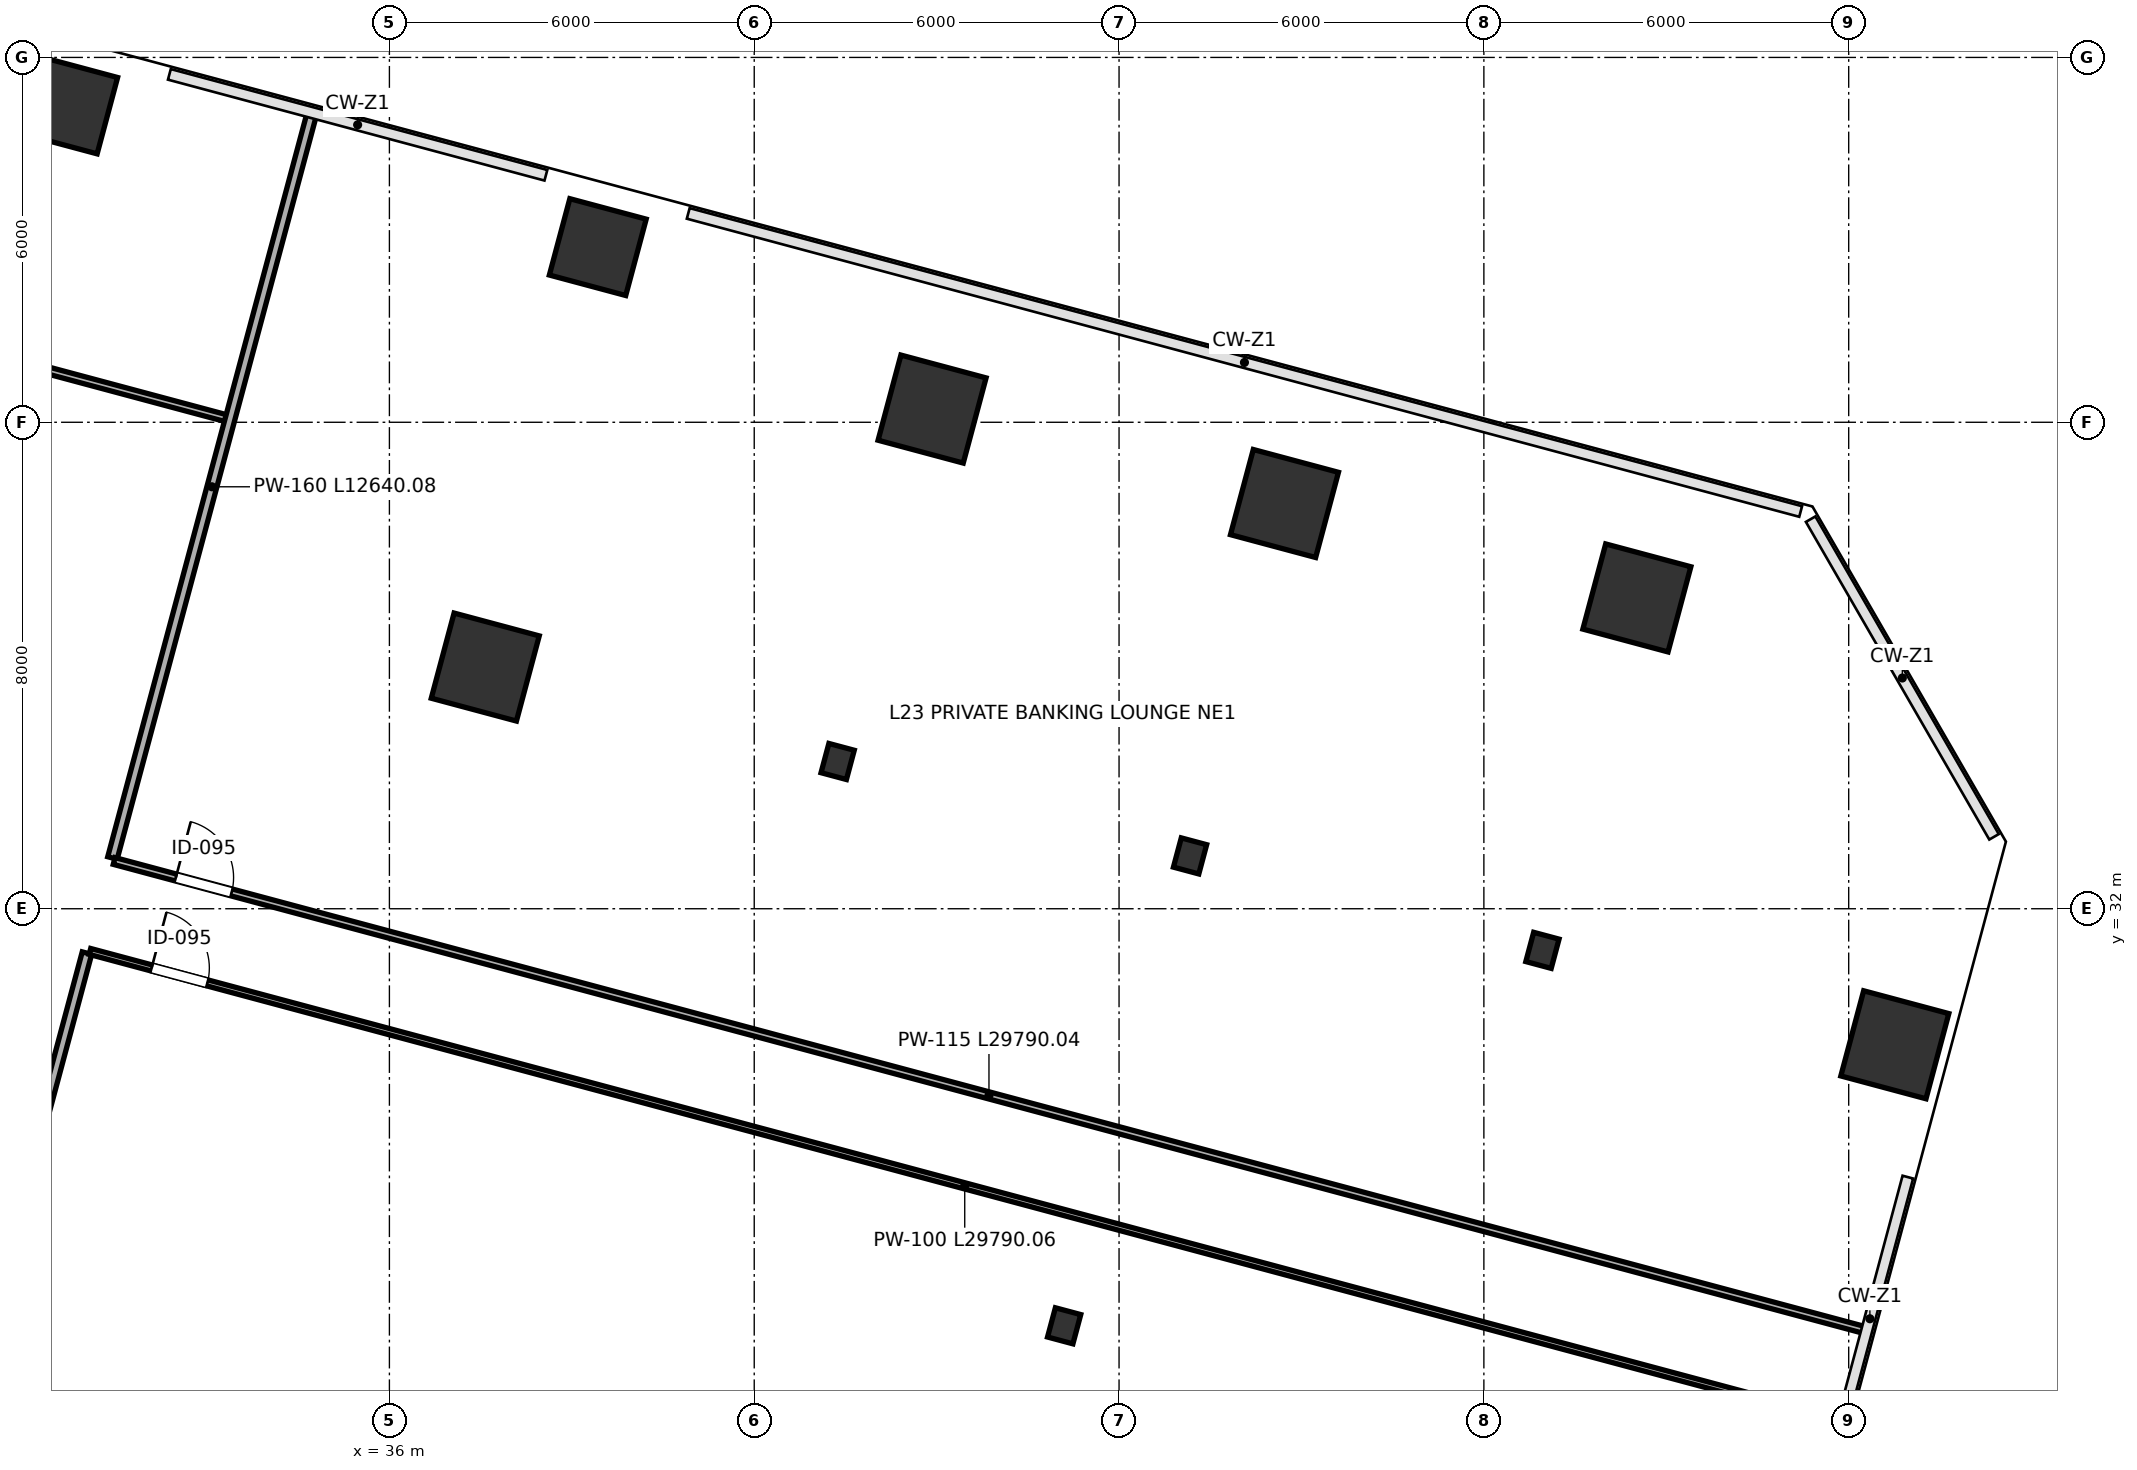
"""IFC4 building model, lengths in metres.
Left out: names, types, materials, properties, quantities, classifications, styles, units other than length and angle.
Written with IfcOpenShell. Run it as: python <this file> out.ifc"""

import sys

from ifc_helpers import new_model, si_unit, direction, frame, frame_2d, origin, origin_2d, place, context, subcontext, project, spatial, rectangle, i_section, extrude, clip, halfspace, source, transform, mapped, element, fill, save


model = new_model("IFC4")
c1 = context("Model", 3, precision=1e-05, world=origin(), true_north=direction((0.0, 1.0)))
c2 = subcontext(c1, "Body", "Model", "MODEL_VIEW")
j1 = project(units=[si_unit("LENGTHUNIT", "METRE"), si_unit("PLANEANGLEUNIT", "RADIAN")], contexts=[c1])
p1 = place(None, origin())
s1 = spatial("IfcSite", under=j1, at=p1, CompositionType="ELEMENT")
p2 = place(p1, origin())
s2 = spatial("IfcBuilding", under=s1, at=p2, CompositionType="ELEMENT")
p3 = place(p2, frame((0.0, 0.0, 104.2)))
s3 = spatial("IfcBuildingStorey", under=s2, at=p3, CompositionType="ELEMENT", Elevation=104.2)
p4 = place(p3, frame((30.734, 45.21, 0.0), z_axis=(0.067889968656, -0.048542486121, 0.996511203749), x_axis=(-0.771615774853, -0.635722031456, 0.021600803684)))
e1 = element("IfcColumn", 1, at=p4, inside=s3, PredefinedType="COLUMN", context=c2, shape_type="Clipping", body=[
    clip(clip(extrude(rectangle(XDim=1.3, YDim=1.3, at=origin_2d()), origin(), (0.0, 0.0, 1.0), 4.215), halfspace(frame((0.0, 0.0, 0.067), z_axis=(0.0, 0.0, -1.0), x_axis=(1.0, 0.0, 0.0)), False)), halfspace(frame((0.0, 0.0, 4.147), z_axis=(0.0, 0.0, 1.0), x_axis=(1.0, 0.0, 0.0)), False)),
])
p5 = place(p3, frame((37.576, 35.975, 0.0), z_axis=(0.019691201847, -0.083455946651, 0.99631689815), x_axis=(-0.999328424662, 0.029157610991, 0.022193093171)))
e2 = element("IfcColumn", 2, at=p5, inside=s3, PredefinedType="COLUMN", context=c2, shape_type="Clipping", body=[
    clip(clip(extrude(rectangle(XDim=1.45, YDim=1.45, at=origin_2d()), origin(), (0.0, 0.0, 1.0), 4.216), halfspace(frame((0.0, 0.0, 0.077), z_axis=(0.0, 0.0, -1.0), x_axis=(1.0, 0.0, 0.0)), False)), halfspace(frame((0.0, 0.0, 4.138), z_axis=(0.0, 0.0, 1.0), x_axis=(1.0, 0.0, 0.0)), False)),
])
p6 = place(p3, frame((39.427, 42.881, 0.0), z_axis=(0.055187214382, -0.09315370637, 0.994121098437), x_axis=(-0.962180939911, -0.270965921455, 0.028023352452)))
e3 = element("IfcColumn", 3, at=p6, inside=s3, PredefinedType="COLUMN", context=c2, shape_type="Clipping", body=[
    clip(clip(extrude(rectangle(XDim=1.3, YDim=1.3, at=origin_2d()), origin(), (0.0, 0.0, 1.0), 4.225), halfspace(frame((0.0, 0.0, 0.087), z_axis=(0.0, 0.0, -1.0), x_axis=(1.0, 0.0, 0.0)), False)), halfspace(frame((0.0, 0.0, 4.137), z_axis=(0.0, 0.0, 1.0), x_axis=(1.0, 0.0, 0.0)), False)),
])
p7 = place(p3, frame((43.372, 34.422, 0.0), z_axis=(0.011261876741, -0.113023039907, 0.993528541403), x_axis=(-0.986662274409, 0.160104186763, 0.029397374702)))
e4 = element("IfcColumn", 4, at=p7, inside=s3, PredefinedType="COLUMN", context=c2, shape_type="Clipping", body=[
    clip(clip(extrude(i_section(OverallWidth=0.432, OverallDepth=0.498, WebThickness=0.056, FlangeThickness=0.089, FilletRadius=0.015, at=origin_2d()), origin(), (0.0, 0.0, 1.0), 4.227), halfspace(frame((0.0, 0.0, 0.035), z_axis=(0.0, 0.0, -1.0), x_axis=(1.0, 0.0, 0.0)), False)), halfspace(frame((0.0, 0.0, 4.193), z_axis=(0.0, 0.0, 1.0), x_axis=(1.0, 0.0, 0.0)), False)),
])
p8 = place(p3, frame((44.925, 40.217, 0.0), z_axis=(0.041047961289, -0.121183728413, 0.99178100851), x_axis=(-0.997219027055, -0.066765268873, 0.033115116671)))
e5 = element("IfcColumn", 5, at=p8, inside=s3, PredefinedType="COLUMN", context=c2, shape_type="Clipping", body=[
    clip(clip(extrude(rectangle(XDim=1.45, YDim=1.45, at=origin_2d()), origin(), (0.0, 0.0, 1.0), 4.235), halfspace(frame((0.0, 0.0, 0.115), z_axis=(0.0, 0.0, -1.0), x_axis=(1.0, 0.0, 0.0)), False)), halfspace(frame((0.0, 0.0, 4.12), z_axis=(0.0, 0.0, 1.0), x_axis=(1.0, 0.0, 0.0)), False)),
])
p9 = place(p3, frame((47.097, 25.141, 0.0), z_axis=(-0.036682452991, -0.131354278291, 0.990656575821), x_axis=(-0.861364861032, 0.506758959131, 0.035297783485)))
e6 = element("IfcColumn", 6, at=p9, inside=s3, PredefinedType="COLUMN", context=c2, shape_type="Clipping", body=[
    clip(clip(extrude(i_section(OverallWidth=0.432, OverallDepth=0.498, WebThickness=0.056, FlangeThickness=0.089, FilletRadius=0.015, at=origin_2d()), origin(), (0.0, 0.0, 1.0), 4.24), halfspace(frame((0.0, 0.0, 0.042), z_axis=(0.0, 0.0, -1.0), x_axis=(1.0, 0.0, 0.0)), False)), halfspace(frame((0.0, 0.0, 4.198), z_axis=(0.0, 0.0, 1.0), x_axis=(1.0, 0.0, 0.0)), False)),
])
p10 = place(p3, frame((49.167, 32.869, 0.0), z_axis=(0.002934421261, -0.142290662346, 0.989820567871), x_axis=(-0.971002586925, 0.236214165868, 0.036835363839)))
e7 = element("IfcColumn", 7, at=p10, inside=s3, PredefinedType="COLUMN", context=c2, shape_type="Clipping", body=[
    clip(clip(extrude(i_section(OverallWidth=0.432, OverallDepth=0.498, WebThickness=0.056, FlangeThickness=0.089, FilletRadius=0.015, at=origin_2d()), origin(), (0.0, 0.0, 1.0), 4.243), halfspace(frame((0.0, 0.0, 0.043), z_axis=(0.0, 0.0, -1.0), x_axis=(1.0, 0.0, 0.0)), False)), halfspace(frame((0.0, 0.0, 4.2), z_axis=(0.0, 0.0, 1.0), x_axis=(1.0, 0.0, 0.0)), False)),
])
p11 = place(p3, frame((50.72, 38.664, 0.0), z_axis=(0.032566924694, -0.150370738711, 0.988093131418), x_axis=(-0.998171026608, 0.04548495086, 0.039821111053)))
e8 = element("IfcColumn", 8, at=p11, inside=s3, PredefinedType="COLUMN", context=c2, shape_type="Clipping", body=[
    clip(clip(extrude(rectangle(XDim=1.45, YDim=1.45, at=origin_2d()), origin(), (0.0, 0.0, 1.0), 4.25), halfspace(frame((0.0, 0.0, 0.139), z_axis=(0.0, 0.0, -1.0), x_axis=(1.0, 0.0, 0.0)), False)), halfspace(frame((0.0, 0.0, 4.112), z_axis=(0.0, 0.0, 1.0), x_axis=(1.0, 0.0, 0.0)), False)),
])
p12 = place(p3, frame((54.963, 31.316, 0.0), z_axis=(-0.005383376269, -0.171237181336, 0.985215127263), x_axis=(-0.957436314569, 0.285218423509, 0.044341340041)))
e9 = element("IfcColumn", 9, at=p12, inside=s3, PredefinedType="COLUMN", context=c2, shape_type="Clipping", body=[
    clip(clip(extrude(i_section(OverallWidth=0.432, OverallDepth=0.498, WebThickness=0.056, FlangeThickness=0.089, FilletRadius=0.015, at=origin_2d()), origin(), (0.0, 0.0, 1.0), 4.263), halfspace(frame((0.0, 0.0, 0.052), z_axis=(0.0, 0.0, -1.0), x_axis=(1.0, 0.0, 0.0)), False)), halfspace(frame((0.0, 0.0, 4.211), z_axis=(0.0, 0.0, 1.0), x_axis=(1.0, 0.0, 0.0)), False)),
])
p13 = place(p3, frame((56.516, 37.111, 0.0), z_axis=(0.024126371662, -0.179175471061, 0.983521259943), x_axis=(-0.991256116404, 0.123376535336, 0.04679254449)))
e10 = element("IfcColumn", 10, at=p13, inside=s3, PredefinedType="COLUMN", context=c2, shape_type="Clipping", body=[
    clip(clip(extrude(rectangle(XDim=1.45, YDim=1.45, at=origin_2d()), origin(), (0.0, 0.0, 1.0), 4.27), halfspace(frame((0.0, 0.0, 0.164), z_axis=(0.0, 0.0, -1.0), x_axis=(1.0, 0.0, 0.0)), False)), halfspace(frame((0.0, 0.0, 4.106), z_axis=(0.0, 0.0, 1.0), x_axis=(1.0, 0.0, 0.0)), False)),
])
p14 = place(p3, frame((60.759, 29.763, 0.0), z_axis=(-0.013554887194, -0.199678296222, 0.979767749546), x_axis=(-0.946533328011, 0.31842027609, 0.051799485898)))
e11 = element("IfcColumn", 11, at=p14, inside=s3, PredefinedType="COLUMN", context=c2, shape_type="Clipping", body=[
    clip(clip(extrude(rectangle(XDim=1.45, YDim=1.45, at=origin_2d()), origin(), (0.0, 0.0, 1.0), 4.287), halfspace(frame((0.0, 0.0, 0.182), z_axis=(0.0, 0.0, -1.0), x_axis=(1.0, 0.0, 0.0)), False)), halfspace(frame((0.0, 0.0, 4.104), z_axis=(0.0, 0.0, 1.0), x_axis=(1.0, 0.0, 0.0)), False)),
])
p15 = place(p3, frame((8.071, 46.831, 0.0), z_axis=(0.0, 0.0, 1.0), x_axis=(0.965925848141, -0.258818963551, 0.0)))
e12 = element("IfcWall", 12, at=p15, inside=s3, PredefinedType="PARTITIONING", context=c2, shape_type="SweptSolid", body=[
    extrude(rectangle(XDim=26.16, YDim=0.115, at=frame_2d((13.08, 0.0))), origin(), (0.0, 0.0, 1.0), 3.96),
])
p16 = place(p15, frame((1.05, 0.0, 0.0)))
e13 = element("IfcOpeningElement", 13, at=p16, cuts=e12, PredefinedType="OPENING", context=c2, shape_type="SweptSolid", body=[
    extrude(rectangle(XDim=0.95, YDim=2.15, at=frame_2d((0.475, 1.075))), frame((0.0, 0.067, 0.0), z_axis=(0.0, -1.0, 0.0), x_axis=(1.0, 0.0, 0.0)), (0.0, 0.0, 1.0), 0.135),
])
p17 = place(p3, frame((31.445, 32.834, 0.0), z_axis=(0.0, 0.0, 1.0), x_axis=(0.258816538161, 0.965926498018, 0.0)))
e14 = element("IfcWall", 14, at=p17, inside=s3, PredefinedType="PARTITIONING", context=c2, shape_type="SweptSolid", body=[
    extrude(rectangle(XDim=12.64, YDim=0.16, at=frame_2d((6.32, 0.0))), origin(), (0.0, 0.0, 1.0), 3.095),
])
p18 = place(p3, frame((25.906, 12.164, 0.0), z_axis=(0.0, 0.0, 1.0), x_axis=(0.258805595447, 0.965929430013, 0.0)))
e15 = element("IfcWall", 15, at=p18, inside=s3, PredefinedType="PARTITIONING", context=c2, shape_type="SweptSolid", body=[
    extrude(rectangle(XDim=19.78, YDim=0.16, at=frame_2d((9.89, 0.0))), origin(), (0.0, 0.0, 1.0), 3.96),
])
p19 = place(p3, frame((31.473, 32.785, 0.0), z_axis=(0.0, 0.0, 1.0), x_axis=(0.965927931901, -0.258811186722, 0.0)))
e16 = element("IfcWall", 16, at=p19, inside=s3, PredefinedType="PARTITIONING", context=c2, shape_type="SweptSolid", body=[
    extrude(rectangle(XDim=29.79, YDim=0.115, at=frame_2d((14.895, 0.0))), origin(), (0.0, 0.0, 1.0), 3.095),
])
p20 = place(p19, frame((1.05, 0.0, 0.0)))
e17 = element("IfcOpeningElement", 17, at=p20, cuts=e16, PredefinedType="OPENING", context=c2, shape_type="SweptSolid", body=[
    extrude(rectangle(XDim=0.95, YDim=2.15, at=frame_2d((0.475, 1.075))), frame((0.0, 0.067, 0.0), z_axis=(0.0, -1.0, 0.0), x_axis=(1.0, 0.0, 0.0)), (0.0, 0.0, 1.0), 0.135),
])
p21 = place(p3, frame((31.074, 31.298, 0.0), z_axis=(0.0, 0.0, 1.0), x_axis=(0.96592643206, -0.258816784325, 0.0)))
e18 = element("IfcWall", 18, at=p21, inside=s3, PredefinedType="PARTITIONING", context=c2, shape_type="SweptSolid", body=[
    extrude(rectangle(XDim=29.79, YDim=0.1, at=frame_2d((14.895, 0.0))), origin(), (0.0, 0.0, 1.0), 3.095),
])
p22 = place(p21, frame((1.05, 0.0, 0.0)))
e19 = element("IfcOpeningElement", 19, at=p22, cuts=e18, PredefinedType="OPENING", context=c2, shape_type="SweptSolid", body=[
    extrude(rectangle(XDim=0.95, YDim=2.15, at=frame_2d((0.475, 1.075))), frame((0.0, 0.06, 0.0), z_axis=(0.0, -1.0, 0.0), x_axis=(1.0, 0.0, 0.0)), (0.0, 0.0, 1.0), 0.12),
])
m1 = source(origin(), c2, "Body", "SweptSolid", [
    extrude(rectangle(XDim=0.95, YDim=2.15, at=frame_2d((0.475, 1.075))), frame((0.0, 0.025, 0.0), z_axis=(0.0, -1.0, 0.0), x_axis=(1.0, 0.0, 0.0)), (0.0, 0.0, 1.0), 0.05),
])
p23 = place(p20, origin())
e20 = element("IfcDoor", 20, at=p23, inside=s3, OperationType="SINGLE_SWING_LEFT", PredefinedType="DOOR", context=c2, shape_type="MappedRepresentation", body=[
    mapped(m1, transform((0.0, 0.0, 0.0), scale=1.0)),
])
fill(e17, e20)
p24 = place(p22, origin())
e21 = element("IfcDoor", 21, at=p24, inside=s3, OperationType="SINGLE_SWING_LEFT", PredefinedType="DOOR", context=c2, shape_type="MappedRepresentation", body=[
    mapped(m1, transform((0.0, 0.0, 0.0), scale=1.0)),
])
fill(e19, e21)
save(model, sys.argv[1])
